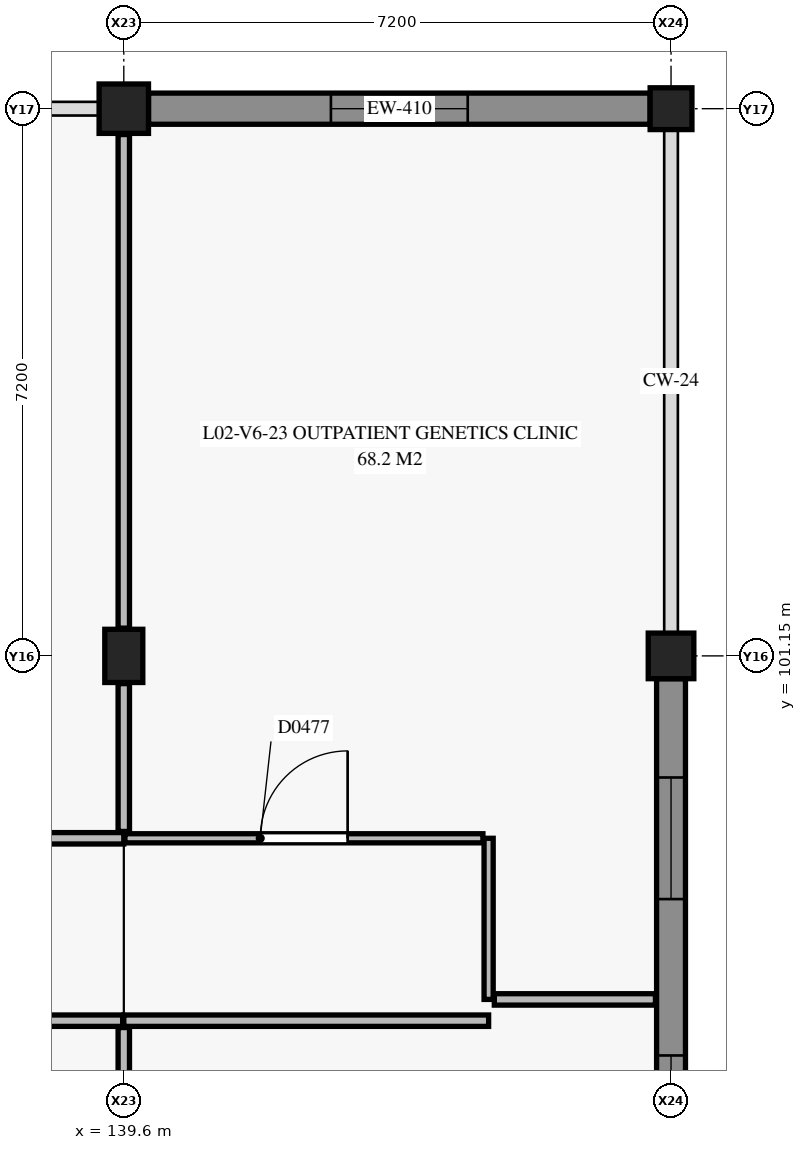
"""IFC4 building model, lengths in metres.
Left out: names, types, materials, properties, quantities, classifications, styles, units other than length and angle.
Written with IfcOpenShell. Run it as: python <this file> out.ifc"""

import sys

from ifc_helpers import new_model, si_unit, direction, frame, frame_2d, origin, origin_2d, place, context, subcontext, project, spatial, rectangle, circle, extrude, element, fill, save


model = new_model("IFC4")
c1 = context("Model", 3, precision=1e-05, world=origin(), true_north=direction((0.0, 1.0)))
c2 = subcontext(c1, "Body", "Model", "MODEL_VIEW")
j1 = project(units=[si_unit("LENGTHUNIT", "METRE"), si_unit("PLANEANGLEUNIT", "RADIAN")], contexts=[c1])
p1 = place(None, origin())
s1 = spatial("IfcSite", under=j1, at=p1, CompositionType="ELEMENT")
p2 = place(p1, origin())
s2 = spatial("IfcBuilding", under=s1, at=p2, CompositionType="ELEMENT")
p3 = place(p2, frame((0.0, 0.0, 9.0)))
s3 = spatial("IfcBuildingStorey", under=s2, at=p3, CompositionType="ELEMENT", Elevation=9.0)
p4 = place(p3, frame((139.6, 101.15, 0.0), z_axis=(0.0, 0.0, 1.0), x_axis=(1.0, 0.0, 0.0)))
e1 = element("IfcColumn", 1, at=p4, inside=s3, PredefinedType="COLUMN", context=c2, shape_type="SweptSolid", body=[
    extrude(rectangle(XDim=0.5, YDim=0.7, at=origin_2d()), origin(), (0.0, 0.0, 1.0), 4.2),
])
p5 = place(p3, frame((139.6, 108.35, 0.0), z_axis=(0.0, 0.0, 1.0), x_axis=(1.0, 0.0, 0.0)))
e2 = element("IfcColumn", 2, at=p5, inside=s3, PredefinedType="COLUMN", context=c2, shape_type="SweptSolid", body=[
    extrude(circle(Radius=0.325, at=origin_2d()), origin(), (0.0, 0.0, 1.0), 4.2),
])
p6 = place(p3, frame((146.8, 101.15, 0.0), z_axis=(0.0, 0.0, 1.0), x_axis=(1.0, 0.0, 0.0)))
e3 = element("IfcColumn", 3, at=p6, inside=s3, PredefinedType="COLUMN", context=c2, shape_type="SweptSolid", body=[
    extrude(rectangle(XDim=0.6, YDim=0.6, at=origin_2d()), origin(), (0.0, 0.0, 1.0), 4.2),
])
p7 = place(p3, frame((146.8, 108.35, 0.0), z_axis=(0.0, 0.0, 1.0), x_axis=(1.0, 0.0, 0.0)))
e4 = element("IfcColumn", 4, at=p7, inside=s3, PredefinedType="COLUMN", context=c2, shape_type="SweptSolid", body=[
    extrude(rectangle(XDim=0.55, YDim=0.55, at=origin_2d()), origin(), (0.0, 0.0, 1.0), 4.2),
])
p8 = place(p3, frame((139.925, 108.35, 0.0), z_axis=(0.0, 0.0, 1.0), x_axis=(1.0, 0.0, 0.0)))
e5 = element("IfcWall", 5, at=p8, inside=s3, PredefinedType="USERDEFINED", context=c2, shape_type="SweptSolid", body=[
    extrude(rectangle(XDim=6.6, YDim=0.41, at=frame_2d((3.3, 0.0))), origin(), (0.0, 0.0, 1.0), 3.13),
])
p9 = place(p8, frame((2.4, 0.0, 0.9)))
e6 = element("IfcOpeningElement", 6, at=p9, cuts=e5, PredefinedType="OPENING", context=c2, shape_type="SweptSolid", body=[
    extrude(rectangle(XDim=1.8, YDim=0.9, at=frame_2d((0.9, 0.45))), frame((0.0, 0.215, 0.0), z_axis=(0.0, -1.0, 0.0), x_axis=(1.0, 0.0, 0.0)), (0.0, 0.0, 1.0), 0.43),
])
p10 = place(p3, frame((146.8, 100.85, 0.0), z_axis=(0.0, 0.0, 1.0), x_axis=(0.0, -1.0, 0.0)))
e7 = element("IfcWall", 7, at=p10, inside=s3, PredefinedType="USERDEFINED", context=c2, shape_type="SweptSolid", body=[
    extrude(rectangle(XDim=6.575, YDim=0.38, at=frame_2d((3.288, 0.0))), origin(), (0.0, 0.0, 1.0), 3.13),
])
p11 = place(p10, frame((1.3, 0.0, 0.9)))
e8 = element("IfcOpeningElement", 8, at=p11, cuts=e7, PredefinedType="OPENING", context=c2, shape_type="SweptSolid", body=[
    extrude(rectangle(XDim=1.6, YDim=1.8, at=frame_2d((0.8, 0.9))), frame((0.0, 0.2, 0.0), z_axis=(0.0, -1.0, 0.0), x_axis=(1.0, 0.0, 0.0)), (0.0, 0.0, 1.0), 0.4),
])
p12 = place(p10, frame((4.958, 0.0, 0.95)))
e9 = element("IfcOpeningElement", 9, at=p12, cuts=e7, PredefinedType="OPENING", context=c2, shape_type="SweptSolid", body=[
    extrude(rectangle(XDim=0.9, YDim=1.2, at=frame_2d((0.45, 0.6))), frame((0.0, 0.2, 0.0), z_axis=(0.0, -1.0, 0.0), x_axis=(1.0, 0.0, 0.0)), (0.0, 0.0, 1.0), 0.4),
])
p13 = place(p3, frame((139.6, 96.35, 0.0), z_axis=(0.0, 0.0, 1.0), x_axis=(1.0, 0.0, 0.0)))
e10 = element("IfcWall", 10, at=p13, inside=s3, PredefinedType="PARTITIONING", context=c2, shape_type="SweptSolid", body=[
    extrude(rectangle(XDim=4.8, YDim=0.15, at=frame_2d((2.4, 0.0))), origin(), (0.0, 0.0, 1.0), 3.285),
])
p14 = place(p3, frame((136.265, 96.35, 0.0), z_axis=(0.0, 0.0, 1.0), x_axis=(1.0, 0.0, 0.0)))
e11 = element("IfcWall", 11, at=p14, inside=s3, PredefinedType="PARTITIONING", context=c2, shape_type="SweptSolid", body=[
    extrude(rectangle(XDim=3.32, YDim=0.15, at=frame_2d((1.66, 0.0))), origin(), (0.0, 0.0, 1.0), 3.285),
])
p15 = place(p14, frame((1.035, 0.0, 0.0)))
e12 = element("IfcOpeningElement", 12, at=p15, cuts=e11, PredefinedType="OPENING", context=c2, shape_type="SweptSolid", body=[
    extrude(rectangle(XDim=1.25, YDim=2.15, at=frame_2d((0.625, 1.075))), frame((0.0, 0.085, 0.0), z_axis=(0.0, -1.0, 0.0), x_axis=(1.0, 0.0, 0.0)), (0.0, 0.0, 1.0), 0.17),
])
p16 = place(p3, frame((136.25, 98.75, 0.0), z_axis=(0.0, 0.0, 1.0), x_axis=(1.0, 0.0, 0.0)))
e13 = element("IfcWall", 13, at=p16, inside=s3, PredefinedType="PARTITIONING", context=c2, shape_type="SweptSolid", body=[
    extrude(rectangle(XDim=3.35, YDim=0.15, at=frame_2d((1.675, 0.0))), origin(), (0.0, 0.0, 1.0), 3.285),
])
p17 = place(p16, frame((1.2, 0.0, 0.0)))
e14 = element("IfcOpeningElement", 14, at=p17, cuts=e13, PredefinedType="OPENING", context=c2, shape_type="SweptSolid", body=[
    extrude(rectangle(XDim=0.95, YDim=2.1, at=frame_2d((0.475, 1.05))), frame((0.0, 0.085, 0.0), z_axis=(0.0, -1.0, 0.0), x_axis=(1.0, 0.0, 0.0)), (0.0, 0.0, 1.0), 0.17),
])
p18 = place(p3, frame((144.4, 96.63, 0.0), z_axis=(0.0, 0.0, 1.0), x_axis=(0.0, 1.0, 0.0)))
e15 = element("IfcWall", 15, at=p18, inside=s3, PredefinedType="PARTITIONING", context=c2, shape_type="SweptSolid", body=[
    extrude(rectangle(XDim=2.12, YDim=0.12, at=frame_2d((1.06, 0.0))), origin(), (0.0, 0.0, 1.0), 3.475),
])
p19 = place(p3, frame((139.615, 98.75, 0.0), z_axis=(0.0, 0.0, 1.0), x_axis=(1.0, 0.0, 0.0)))
e16 = element("IfcWall", 16, at=p19, inside=s3, PredefinedType="PARTITIONING", context=c2, shape_type="SweptSolid", body=[
    extrude(rectangle(XDim=4.71, YDim=0.12, at=frame_2d((2.355, 0.0))), origin(), (0.0, 0.0, 1.0), 3.285),
])
p20 = place(p19, frame((1.78, 0.0, 0.0)))
e17 = element("IfcOpeningElement", 17, at=p20, cuts=e16, PredefinedType="OPENING", context=c2, shape_type="SweptSolid", body=[
    extrude(rectangle(XDim=1.15, YDim=2.15, at=frame_2d((0.575, 1.075))), frame((0.0, 0.07, 0.0), z_axis=(0.0, -1.0, 0.0), x_axis=(1.0, 0.0, 0.0)), (0.0, 0.0, 1.0), 0.14),
])
p21 = place(p3, frame((139.6, 94.165, 0.0), z_axis=(0.0, 0.0, 1.0), x_axis=(0.0, 1.0, 0.0)))
e18 = element("IfcWall", 18, at=p21, inside=s3, PredefinedType="PARTITIONING", context=c2, shape_type="SweptSolid", body=[
    extrude(rectangle(XDim=2.095, YDim=0.15, at=frame_2d((1.047, 0.0))), origin(), (0.0, 0.0, 1.0), 3.285),
])
p22 = place(p3, frame((144.475, 96.63, 0.0), z_axis=(0.0, 0.0, 1.0), x_axis=(1.0, 0.0, 0.0)))
e19 = element("IfcWall", 19, at=p22, inside=s3, PredefinedType="PARTITIONING", context=c2, shape_type="SweptSolid", body=[
    extrude(rectangle(XDim=2.12, YDim=0.15, at=frame_2d((1.06, 0.0))), origin(), (0.0, 0.0, 1.0), 3.95),
])
p23 = place(p3, frame((139.6, 98.84, 0.0), z_axis=(0.0, 0.0, 1.0), x_axis=(0.0, 1.0, 0.0)))
e20 = element("IfcWall", 20, at=p23, inside=s3, PredefinedType="PARTITIONING", context=c2, shape_type="SweptSolid", body=[
    extrude(rectangle(XDim=1.945, YDim=0.15, at=frame_2d((0.972, 0.0))), origin(), (0.0, 0.0, 1.0), 3.285),
])
p24 = place(p3, frame((139.6, 101.515, 0.0), z_axis=(0.0, 0.0, 1.0), x_axis=(0.0, 1.0, 0.0)))
e21 = element("IfcWall", 21, at=p24, inside=s3, PredefinedType="PARTITIONING", context=c2, shape_type="SweptSolid", body=[
    extrude(rectangle(XDim=6.495, YDim=0.15, at=frame_2d((3.248, 0.0))), origin(), (0.0, 0.0, 1.0), 3.285),
])
p25 = place(p9, origin())
e22 = element("IfcWindow", 22, at=p25, inside=s3, PartitioningType="SINGLE_PANEL", PredefinedType="WINDOW", context=c2, shape_type="SweptSolid", body=[
    extrude(rectangle(XDim=1.8, YDim=0.9, at=frame_2d((0.9, 0.45))), frame((0.0, 0.03, 0.0), z_axis=(0.0, -1.0, 0.0), x_axis=(1.0, 0.0, 0.0)), (0.0, 0.0, 1.0), 0.06),
])
fill(e6, e22)
p26 = place(p11, origin())
e23 = element("IfcWindow", 23, at=p26, inside=s3, PartitioningType="SINGLE_PANEL", PredefinedType="WINDOW", context=c2, shape_type="SweptSolid", body=[
    extrude(rectangle(XDim=1.6, YDim=1.8, at=frame_2d((0.8, 0.9))), frame((0.0, 0.03, 0.0), z_axis=(0.0, -1.0, 0.0), x_axis=(1.0, 0.0, 0.0)), (0.0, 0.0, 1.0), 0.06),
])
fill(e8, e23)
p27 = place(p12, origin())
e24 = element("IfcWindow", 24, at=p27, inside=s3, PartitioningType="SINGLE_PANEL", PredefinedType="WINDOW", context=c2, shape_type="SweptSolid", body=[
    extrude(rectangle(XDim=0.9, YDim=1.2, at=frame_2d((0.45, 0.6))), frame((0.0, 0.03, 0.0), z_axis=(0.0, -1.0, 0.0), x_axis=(1.0, 0.0, 0.0)), (0.0, 0.0, 1.0), 0.06),
])
fill(e9, e24)
p28 = place(p20, origin())
e25 = element("IfcDoor", 25, at=p28, inside=s3, OperationType="SINGLE_SWING_RIGHT", PredefinedType="DOOR", context=c2, shape_type="SweptSolid", body=[
    extrude(rectangle(XDim=1.15, YDim=2.15, at=frame_2d((0.575, 1.075))), frame((0.0, 0.025, 0.0), z_axis=(0.0, -1.0, 0.0), x_axis=(1.0, 0.0, 0.0)), (0.0, 0.0, 1.0), 0.05),
])
fill(e17, e25)
save(model, sys.argv[1])
